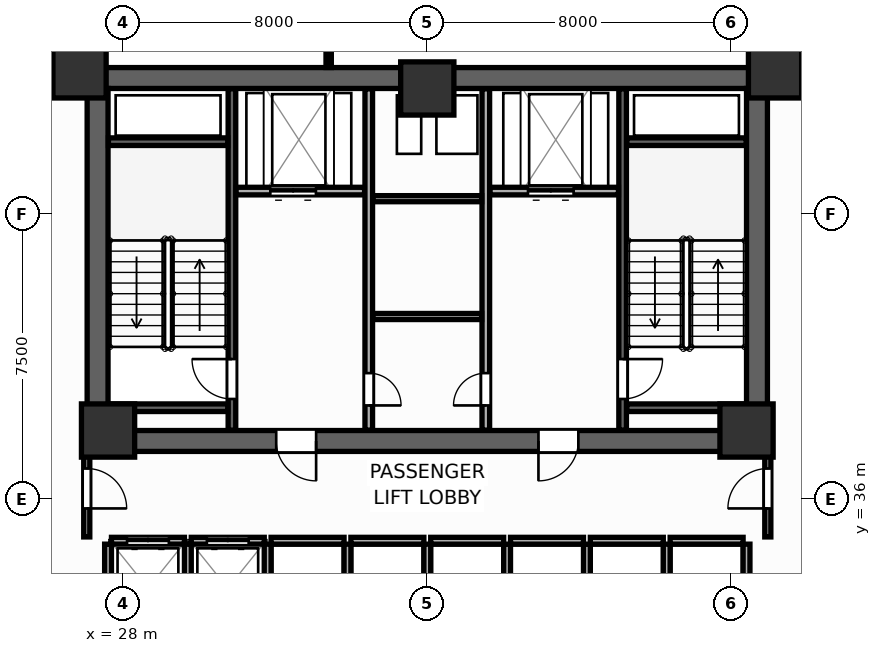
"""IFC4 building model, lengths in metres.
Left out: names, types, materials, properties, quantities, classifications, styles, units other than length and angle.
Written with IfcOpenShell. Run it as: python <this file> out.ifc"""

import sys

from ifc_helpers import new_model, si_unit, direction, frame, frame_2d, origin, origin_2d, place, context, subcontext, project, spatial, rectangle, extrude, source, transform, mapped, element, fill, save


model = new_model("IFC4")
c1 = context("Model", 3, precision=1e-05, world=origin(), true_north=direction((0.0, 1.0)))
c2 = subcontext(c1, "Body", "Model", "MODEL_VIEW")
j1 = project(units=[si_unit("LENGTHUNIT", "METRE"), si_unit("PLANEANGLEUNIT", "RADIAN")], contexts=[c1])
p1 = place(None, origin())
s1 = spatial("IfcSite", under=j1, at=p1, CompositionType="ELEMENT")
p2 = place(p1, origin())
s2 = spatial("IfcBuilding", under=s1, at=p2, CompositionType="ELEMENT")
p3 = place(p2, frame((0.0, 0.0, 27.9)))
s3 = spatial("IfcBuildingStorey", under=s2, at=p3, CompositionType="ELEMENT", Elevation=27.9)
p4 = place(p3, frame((27.05, 47.075, 0.0), z_axis=(0.0, 0.0, 1.0), x_axis=(1.0, 0.0, 0.0)))
e1 = element("IfcWall", 1, at=p4, inside=s3, PredefinedType="SHEAR", context=c2, shape_type="SweptSolid", body=[
    extrude(rectangle(XDim=17.9, YDim=0.55, at=frame_2d((8.95, 0.0))), origin(), (0.0, 0.0, 1.0), 3.9),
])
p5 = place(p3, frame((27.05, 37.525, 0.0), z_axis=(0.0, 0.0, 1.0), x_axis=(1.0, 0.0, 0.0)))
e2 = element("IfcWall", 2, at=p5, inside=s3, PredefinedType="SHEAR", context=c2, shape_type="SweptSolid", body=[
    extrude(rectangle(XDim=17.9, YDim=0.55, at=frame_2d((8.95, 0.0))), origin(), (0.0, 0.0, 1.0), 3.9),
])
p6 = place(p5, frame((4.975, 0.0, 0.0)))
e3 = element("IfcOpeningElement", 3, at=p6, cuts=e2, PredefinedType="OPENING", context=c2, shape_type="SweptSolid", body=[
    extrude(rectangle(XDim=1.05, YDim=2.1, at=frame_2d((0.525, 1.05))), frame((0.0, 0.285, 0.0), z_axis=(0.0, -1.0, 0.0), x_axis=(1.0, 0.0, 0.0)), (0.0, 0.0, 1.0), 0.57),
])
p7 = place(p5, frame((11.875, 0.0, 0.0)))
e4 = element("IfcOpeningElement", 4, at=p7, cuts=e2, PredefinedType="OPENING", context=c2, shape_type="SweptSolid", body=[
    extrude(rectangle(XDim=1.05, YDim=2.1, at=frame_2d((0.525, 1.05))), frame((0.0, 0.285, 0.0), z_axis=(0.0, -1.0, 0.0), x_axis=(1.0, 0.0, 0.0)), (0.0, 0.0, 1.0), 0.57),
])
for number, where, z_axis, x_axis in (
    (5, (27.325, 37.8, 0.0), (0.0, 0.0, 1.0), (0.0, 1.0, 0.0)),
    (6, (44.675, 37.8, 0.0), (0.0, 0.0, 1.0), (0.0, 1.0, 0.0)),
):
    element("IfcWall", number, at=place(p3, frame(where, z_axis=z_axis, x_axis=x_axis)), inside=s3, PredefinedType="SHEAR", context=c2, shape_type="SweptSolid", body=[
        extrude(rectangle(XDim=9.0, YDim=0.55, at=frame_2d((4.5, 0.0))), origin(), (0.0, 0.0, 1.0), 3.9),
    ])
m1 = source(origin(), c2, "Body", "SweptSolid", [
    extrude(rectangle(XDim=1.4, YDim=1.4, at=origin_2d()), origin(), (0.0, 0.0, 1.0), 3.9),
])
for number, where, z_axis, x_axis in (
    (7, (26.85, 47.25, 0.0), (0.0, 0.0, 1.0), (1.0, 0.0, 0.0)),
    (8, (45.15, 47.25, 0.0), (0.0, 0.0, 1.0), (1.0, 0.0, 0.0)),
    (9, (27.6, 37.8, 0.0), (0.0, 0.0, 1.0), (1.0, 0.0, 0.0)),
    (10, (44.4, 37.8, 0.0), (0.0, 0.0, 1.0), (1.0, 0.0, 0.0)),
    (11, (36.0, 46.8, 0.0), (0.0, 0.0, 1.0), (1.0, 0.0, 0.0)),
):
    element("IfcColumn", number, at=place(p3, frame(where, z_axis=z_axis, x_axis=x_axis)), inside=s3, PredefinedType="COLUMN", context=c2, shape_type="MappedRepresentation", body=[
        mapped(m1, transform((0.0, 0.0, 0.0), scale=1.0)),
    ])
p8 = place(p3, frame((30.86, 37.81, 0.0), z_axis=(0.0, 0.0, 1.0), x_axis=(0.0, 1.0, 0.0)))
e12 = element("IfcWall", 12, at=p8, inside=s3, PredefinedType="SHEAR", context=c2, shape_type="SweptSolid", body=[
    extrude(rectangle(XDim=8.98, YDim=0.2, at=frame_2d((4.49, 0.0))), origin(), (0.0, 0.0, 1.0), 3.9),
])
p9 = place(p8, frame((0.82, 0.0, 0.0)))
e13 = element("IfcOpeningElement", 13, at=p9, cuts=e12, PredefinedType="OPENING", context=c2, shape_type="SweptSolid", body=[
    extrude(rectangle(XDim=1.05, YDim=2.1, at=frame_2d((0.525, 1.05))), frame((0.0, 0.11, 0.0), z_axis=(0.0, -1.0, 0.0), x_axis=(1.0, 0.0, 0.0)), (0.0, 0.0, 1.0), 0.22),
])
for number, where, z_axis, x_axis in (
    (14, (27.61, 45.4, 0.0), (0.0, 0.0, 1.0), (1.0, 0.0, 0.0)),
    (15, (27.61, 38.4, 0.0), (0.0, 0.0, 1.0), (1.0, 0.0, 0.0)),
):
    element("IfcWall", number, at=place(p3, frame(where, z_axis=z_axis, x_axis=x_axis)), inside=s3, PredefinedType="SHEAR", context=c2, shape_type="SweptSolid", body=[
        extrude(rectangle(XDim=3.14, YDim=0.2, at=frame_2d((1.57, 0.0))), origin(), (0.0, 0.0, 1.0), 3.9),
    ])
p10 = place(p3, frame((41.14, 37.81, 0.0), z_axis=(0.0, 0.0, 1.0), x_axis=(0.0, 1.0, 0.0)))
e16 = element("IfcWall", 16, at=p10, inside=s3, PredefinedType="SHEAR", context=c2, shape_type="SweptSolid", body=[
    extrude(rectangle(XDim=8.98, YDim=0.2, at=frame_2d((4.49, 0.0))), origin(), (0.0, 0.0, 1.0), 3.9),
])
p11 = place(p10, frame((0.82, 0.0, 0.0)))
e17 = element("IfcOpeningElement", 17, at=p11, cuts=e16, PredefinedType="OPENING", context=c2, shape_type="SweptSolid", body=[
    extrude(rectangle(XDim=1.05, YDim=2.1, at=frame_2d((0.525, 1.05))), frame((0.0, 0.11, 0.0), z_axis=(0.0, -1.0, 0.0), x_axis=(1.0, 0.0, 0.0)), (0.0, 0.0, 1.0), 0.22),
])
for number, where, z_axis, x_axis in (
    (18, (41.25, 45.4, 0.0), (0.0, 0.0, 1.0), (1.0, 0.0, 0.0)),
    (19, (41.25, 38.4, 0.0), (0.0, 0.0, 1.0), (1.0, 0.0, 0.0)),
):
    element("IfcWall", number, at=place(p3, frame(where, z_axis=z_axis, x_axis=x_axis)), inside=s3, PredefinedType="SHEAR", context=c2, shape_type="SweptSolid", body=[
        extrude(rectangle(XDim=3.14, YDim=0.2, at=frame_2d((1.57, 0.0))), origin(), (0.0, 0.0, 1.0), 3.9),
    ])
p12 = place(p3, frame((30.97, 44.1, 0.0), z_axis=(0.0, 0.0, 1.0), x_axis=(1.0, 0.0, 0.0)))
e20 = element("IfcWall", 20, at=p12, inside=s3, PredefinedType="PARTITIONING", context=c2, shape_type="SweptSolid", body=[
    extrude(rectangle(XDim=3.38, YDim=0.2, at=frame_2d((1.69, 0.0))), origin(), (0.0, 0.0, 1.0), 3.68),
])
p13 = place(p12, frame((0.9, 0.0, 0.0)))
e21 = element("IfcOpeningElement", 21, at=p13, cuts=e20, PredefinedType="OPENING", context=c2, shape_type="SweptSolid", body=[
    extrude(rectangle(XDim=1.2, YDim=2.1, at=frame_2d((0.6, 1.05))), frame((0.0, 0.11, 0.0), z_axis=(0.0, -1.0, 0.0), x_axis=(1.0, 0.0, 0.0)), (0.0, 0.0, 1.0), 0.22),
])
p14 = place(p3, frame((37.65, 44.1, 0.0), z_axis=(0.0, 0.0, 1.0), x_axis=(1.0, 0.0, 0.0)))
e22 = element("IfcWall", 22, at=p14, inside=s3, PredefinedType="PARTITIONING", context=c2, shape_type="SweptSolid", body=[
    extrude(rectangle(XDim=3.38, YDim=0.2, at=frame_2d((1.69, 0.0))), origin(), (0.0, 0.0, 1.0), 3.68),
])
p15 = place(p14, frame((1.0, 0.0, 0.0)))
e23 = element("IfcOpeningElement", 23, at=p15, cuts=e22, PredefinedType="OPENING", context=c2, shape_type="SweptSolid", body=[
    extrude(rectangle(XDim=1.2, YDim=2.1, at=frame_2d((0.6, 1.05))), frame((0.0, 0.11, 0.0), z_axis=(0.0, -1.0, 0.0), x_axis=(1.0, 0.0, 0.0)), (0.0, 0.0, 1.0), 0.22),
])
p16 = place(p3, frame((34.46, 37.81, 0.0), z_axis=(0.0, 0.0, 1.0), x_axis=(0.0, 1.0, 0.0)))
e24 = element("IfcWall", 24, at=p16, inside=s3, PredefinedType="PARTITIONING", context=c2, shape_type="SweptSolid", body=[
    extrude(rectangle(XDim=8.98, YDim=0.2, at=frame_2d((4.49, 0.0))), origin(), (0.0, 0.0, 1.0), 3.68),
])
p17 = place(p16, frame((0.65, 0.0, 0.0)))
e25 = element("IfcOpeningElement", 25, at=p17, cuts=e24, PredefinedType="OPENING", context=c2, shape_type="SweptSolid", body=[
    extrude(rectangle(XDim=0.85, YDim=2.05, at=frame_2d((0.425, 1.025))), frame((0.0, 0.11, 0.0), z_axis=(0.0, -1.0, 0.0), x_axis=(1.0, 0.0, 0.0)), (0.0, 0.0, 1.0), 0.22),
])
p18 = place(p3, frame((37.54, 37.81, 0.0), z_axis=(0.0, 0.0, 1.0), x_axis=(0.0, 1.0, 0.0)))
e26 = element("IfcWall", 26, at=p18, inside=s3, PredefinedType="PARTITIONING", context=c2, shape_type="SweptSolid", body=[
    extrude(rectangle(XDim=8.98, YDim=0.2, at=frame_2d((4.49, 0.0))), origin(), (0.0, 0.0, 1.0), 3.68),
])
p19 = place(p18, frame((0.65, 0.0, 0.0)))
e27 = element("IfcOpeningElement", 27, at=p19, cuts=e26, PredefinedType="OPENING", context=c2, shape_type="SweptSolid", body=[
    extrude(rectangle(XDim=0.85, YDim=2.05, at=frame_2d((0.425, 1.025))), frame((0.0, 0.11, 0.0), z_axis=(0.0, -1.0, 0.0), x_axis=(1.0, 0.0, 0.0)), (0.0, 0.0, 1.0), 0.22),
])
for number, where, z_axis, x_axis in (
    (28, (34.57, 40.8, 0.0), (0.0, 0.0, 1.0), (1.0, 0.0, 0.0)),
    (29, (34.57, 43.9, 0.0), (0.0, 0.0, 1.0), (1.0, 0.0, 0.0)),
):
    element("IfcWall", number, at=place(p3, frame(where, z_axis=z_axis, x_axis=x_axis)), inside=s3, PredefinedType="PARTITIONING", context=c2, shape_type="SweptSolid", body=[
        extrude(rectangle(XDim=2.86, YDim=0.16, at=frame_2d((1.43, 0.0))), origin(), (0.0, 0.0, 1.0), 3.68),
    ])
p20 = place(p3, frame((27.69, 34.9, 0.0), z_axis=(0.0, 0.0, 1.0), x_axis=(1.0, 0.0, 0.0)))
e30 = element("IfcWall", 30, at=p20, inside=s3, PredefinedType="PARTITIONING", context=c2, shape_type="SweptSolid", body=[
    extrude(rectangle(XDim=1.92, YDim=0.18, at=frame_2d((0.96, 0.0))), origin(), (0.0, 0.0, 1.0), 3.68),
])
p21 = place(p20, frame((0.41, 0.0, 0.0)))
e31 = element("IfcOpeningElement", 31, at=p21, cuts=e30, PredefinedType="OPENING", context=c2, shape_type="SweptSolid", body=[
    extrude(rectangle(XDim=1.1, YDim=2.1, at=frame_2d((0.55, 1.05))), frame((0.0, 0.1, 0.0), z_axis=(0.0, -1.0, 0.0), x_axis=(1.0, 0.0, 0.0)), (0.0, 0.0, 1.0), 0.2),
])
p22 = place(p3, frame((27.6, 32.49, 0.0), z_axis=(0.0, 0.0, 1.0), x_axis=(0.0, 1.0, 0.0)))
e32 = element("IfcWall", 32, at=p22, inside=s3, PredefinedType="PARTITIONING", context=c2, shape_type="SweptSolid", body=[
    extrude(rectangle(XDim=2.32, YDim=0.18, at=frame_2d((1.16, 0.0))), origin(), (0.0, 0.0, 1.0), 3.68),
])
p23 = place(p3, frame((29.79, 34.9, 0.0), z_axis=(0.0, 0.0, 1.0), x_axis=(1.0, 0.0, 0.0)))
e33 = element("IfcWall", 33, at=p23, inside=s3, PredefinedType="PARTITIONING", context=c2, shape_type="SweptSolid", body=[
    extrude(rectangle(XDim=1.92, YDim=0.18, at=frame_2d((0.96, 0.0))), origin(), (0.0, 0.0, 1.0), 3.68),
])
p24 = place(p23, frame((0.41, 0.0, 0.0)))
e34 = element("IfcOpeningElement", 34, at=p24, cuts=e33, PredefinedType="OPENING", context=c2, shape_type="SweptSolid", body=[
    extrude(rectangle(XDim=1.1, YDim=2.1, at=frame_2d((0.55, 1.05))), frame((0.0, 0.1, 0.0), z_axis=(0.0, -1.0, 0.0), x_axis=(1.0, 0.0, 0.0)), (0.0, 0.0, 1.0), 0.2),
])
p25 = place(p3, frame((29.7, 32.49, 0.0), z_axis=(0.0, 0.0, 1.0), x_axis=(0.0, 1.0, 0.0)))
e35 = element("IfcWall", 35, at=p25, inside=s3, PredefinedType="PARTITIONING", context=c2, shape_type="SweptSolid", body=[
    extrude(rectangle(XDim=2.32, YDim=0.18, at=frame_2d((1.16, 0.0))), origin(), (0.0, 0.0, 1.0), 3.68),
])
p26 = place(p3, frame((31.89, 34.9, 0.0), z_axis=(0.0, 0.0, 1.0), x_axis=(1.0, 0.0, 0.0)))
e36 = element("IfcWall", 36, at=p26, inside=s3, PredefinedType="PARTITIONING", context=c2, shape_type="SweptSolid", body=[
    extrude(rectangle(XDim=1.92, YDim=0.18, at=frame_2d((0.96, 0.0))), origin(), (0.0, 0.0, 1.0), 3.68),
])
p27 = place(p3, frame((31.8, 32.49, 0.0), z_axis=(0.0, 0.0, 1.0), x_axis=(0.0, 1.0, 0.0)))
e37 = element("IfcWall", 37, at=p27, inside=s3, PredefinedType="PARTITIONING", context=c2, shape_type="SweptSolid", body=[
    extrude(rectangle(XDim=2.32, YDim=0.18, at=frame_2d((1.16, 0.0))), origin(), (0.0, 0.0, 1.0), 3.68),
])
p28 = place(p3, frame((33.99, 34.9, 0.0), z_axis=(0.0, 0.0, 1.0), x_axis=(1.0, 0.0, 0.0)))
e38 = element("IfcWall", 38, at=p28, inside=s3, PredefinedType="PARTITIONING", context=c2, shape_type="SweptSolid", body=[
    extrude(rectangle(XDim=1.92, YDim=0.18, at=frame_2d((0.96, 0.0))), origin(), (0.0, 0.0, 1.0), 3.68),
])
p29 = place(p3, frame((33.9, 32.49, 0.0), z_axis=(0.0, 0.0, 1.0), x_axis=(0.0, 1.0, 0.0)))
e39 = element("IfcWall", 39, at=p29, inside=s3, PredefinedType="PARTITIONING", context=c2, shape_type="SweptSolid", body=[
    extrude(rectangle(XDim=2.32, YDim=0.18, at=frame_2d((1.16, 0.0))), origin(), (0.0, 0.0, 1.0), 3.68),
])
p30 = place(p3, frame((36.09, 34.9, 0.0), z_axis=(0.0, 0.0, 1.0), x_axis=(1.0, 0.0, 0.0)))
e40 = element("IfcWall", 40, at=p30, inside=s3, PredefinedType="PARTITIONING", context=c2, shape_type="SweptSolid", body=[
    extrude(rectangle(XDim=1.92, YDim=0.18, at=frame_2d((0.96, 0.0))), origin(), (0.0, 0.0, 1.0), 3.68),
])
p31 = place(p3, frame((36.0, 32.49, 0.0), z_axis=(0.0, 0.0, 1.0), x_axis=(0.0, 1.0, 0.0)))
e41 = element("IfcWall", 41, at=p31, inside=s3, PredefinedType="PARTITIONING", context=c2, shape_type="SweptSolid", body=[
    extrude(rectangle(XDim=2.32, YDim=0.18, at=frame_2d((1.16, 0.0))), origin(), (0.0, 0.0, 1.0), 3.68),
])
p32 = place(p3, frame((38.19, 34.9, 0.0), z_axis=(0.0, 0.0, 1.0), x_axis=(1.0, 0.0, 0.0)))
e42 = element("IfcWall", 42, at=p32, inside=s3, PredefinedType="PARTITIONING", context=c2, shape_type="SweptSolid", body=[
    extrude(rectangle(XDim=1.92, YDim=0.18, at=frame_2d((0.96, 0.0))), origin(), (0.0, 0.0, 1.0), 3.68),
])
p33 = place(p3, frame((38.1, 32.49, 0.0), z_axis=(0.0, 0.0, 1.0), x_axis=(0.0, 1.0, 0.0)))
e43 = element("IfcWall", 43, at=p33, inside=s3, PredefinedType="PARTITIONING", context=c2, shape_type="SweptSolid", body=[
    extrude(rectangle(XDim=2.32, YDim=0.18, at=frame_2d((1.16, 0.0))), origin(), (0.0, 0.0, 1.0), 3.68),
])
p34 = place(p3, frame((40.29, 34.9, 0.0), z_axis=(0.0, 0.0, 1.0), x_axis=(1.0, 0.0, 0.0)))
e44 = element("IfcWall", 44, at=p34, inside=s3, PredefinedType="PARTITIONING", context=c2, shape_type="SweptSolid", body=[
    extrude(rectangle(XDim=1.92, YDim=0.18, at=frame_2d((0.96, 0.0))), origin(), (0.0, 0.0, 1.0), 3.68),
])
p35 = place(p3, frame((40.2, 32.49, 0.0), z_axis=(0.0, 0.0, 1.0), x_axis=(0.0, 1.0, 0.0)))
e45 = element("IfcWall", 45, at=p35, inside=s3, PredefinedType="PARTITIONING", context=c2, shape_type="SweptSolid", body=[
    extrude(rectangle(XDim=2.32, YDim=0.18, at=frame_2d((1.16, 0.0))), origin(), (0.0, 0.0, 1.0), 3.68),
])
p36 = place(p3, frame((42.39, 34.9, 0.0), z_axis=(0.0, 0.0, 1.0), x_axis=(1.0, 0.0, 0.0)))
e46 = element("IfcWall", 46, at=p36, inside=s3, PredefinedType="PARTITIONING", context=c2, shape_type="SweptSolid", body=[
    extrude(rectangle(XDim=1.92, YDim=0.18, at=frame_2d((0.96, 0.0))), origin(), (0.0, 0.0, 1.0), 3.68),
])
for number, where, z_axis, x_axis in (
    (47, (42.3, 32.49, 0.0), (0.0, 0.0, 1.0), (0.0, 1.0, 0.0)),
    (48, (44.4, 32.49, 0.0), (0.0, 0.0, 1.0), (0.0, 1.0, 0.0)),
):
    element("IfcWall", number, at=place(p3, frame(where, z_axis=z_axis, x_axis=x_axis)), inside=s3, PredefinedType="PARTITIONING", context=c2, shape_type="SweptSolid", body=[
        extrude(rectangle(XDim=2.32, YDim=0.18, at=frame_2d((1.16, 0.0))), origin(), (0.0, 0.0, 1.0), 3.68),
    ])
p37 = place(p3, frame((27.04, 35.0, 0.0), z_axis=(0.0, 0.0, 1.0), x_axis=(0.0, 1.0, 0.0)))
e49 = element("IfcWall", 49, at=p37, inside=s3, PredefinedType="PARTITIONING", context=c2, shape_type="SweptSolid", body=[
    extrude(rectangle(XDim=2.65, YDim=0.16, at=frame_2d((1.325, 0.0))), origin(), (0.0, 0.0, 1.0), 3.68),
])
p38 = place(p37, frame((0.75, 0.0, 0.0)))
e50 = element("IfcOpeningElement", 50, at=p38, cuts=e49, PredefinedType="OPENING", context=c2, shape_type="SweptSolid", body=[
    extrude(rectangle(XDim=1.05, YDim=2.1, at=frame_2d((0.525, 1.05))), frame((0.0, 0.09, 0.0), z_axis=(0.0, -1.0, 0.0), x_axis=(1.0, 0.0, 0.0)), (0.0, 0.0, 1.0), 0.18),
])
p39 = place(p3, frame((44.96, 35.0, 0.0), z_axis=(0.0, 0.0, 1.0), x_axis=(0.0, 1.0, 0.0)))
e51 = element("IfcWall", 51, at=p39, inside=s3, PredefinedType="PARTITIONING", context=c2, shape_type="SweptSolid", body=[
    extrude(rectangle(XDim=2.65, YDim=0.16, at=frame_2d((1.325, 0.0))), origin(), (0.0, 0.0, 1.0), 3.68),
])
p40 = place(p39, frame((0.75, 0.0, 0.0)))
e52 = element("IfcOpeningElement", 52, at=p40, cuts=e51, PredefinedType="OPENING", context=c2, shape_type="SweptSolid", body=[
    extrude(rectangle(XDim=1.05, YDim=2.1, at=frame_2d((0.525, 1.05))), frame((0.0, 0.09, 0.0), z_axis=(0.0, -1.0, 0.0), x_axis=(1.0, 0.0, 0.0)), (0.0, 0.0, 1.0), 0.18),
])
p41 = place(p3, frame((27.035, 47.34, 0.0), z_axis=(0.0, 0.0, 1.0), x_axis=(0.0, 1.0, 0.0)))
e53 = element("IfcWall", 53, at=p41, inside=s3, PredefinedType="PARTITIONING", context=c2, shape_type="SweptSolid", body=[
    extrude(rectangle(XDim=10.41, YDim=0.16, at=frame_2d((5.205, 0.0))), origin(), (0.0, 0.0, 1.0), 3.18),
])
p42 = place(p41, frame((4.73, 0.0, 0.0)))
e54 = element("IfcOpeningElement", 54, at=p42, cuts=e53, PredefinedType="OPENING", context=c2, shape_type="SweptSolid", body=[
    extrude(rectangle(XDim=0.95, YDim=2.05, at=frame_2d((0.475, 1.025))), frame((0.0, 0.09, 0.0), z_axis=(0.0, -1.0, 0.0), x_axis=(1.0, 0.0, 0.0)), (0.0, 0.0, 1.0), 0.18),
])
p43 = place(p3, frame((44.965, 47.34, 0.0), z_axis=(0.0, 0.0, 1.0), x_axis=(0.0, 1.0, 0.0)))
e55 = element("IfcWall", 55, at=p43, inside=s3, PredefinedType="PARTITIONING", context=c2, shape_type="SweptSolid", body=[
    extrude(rectangle(XDim=10.41, YDim=0.16, at=frame_2d((5.205, 0.0))), origin(), (0.0, 0.0, 1.0), 3.18),
])
p44 = place(p3, frame((33.405, 47.352, 0.0), z_axis=(0.0, 0.0, 1.0), x_axis=(0.0, 1.0, 0.0)))
e56 = element("IfcWall", 56, at=p44, inside=s3, PredefinedType="PARTITIONING", context=c2, shape_type="SweptSolid", body=[
    extrude(rectangle(XDim=10.545, YDim=0.14, at=frame_2d((5.272, 0.0))), origin(), (0.0, 0.0, 1.0), 3.68),
])
p45 = place(p44, frame((4.798, 0.0, 0.0)))
e57 = element("IfcOpeningElement", 57, at=p45, cuts=e56, PredefinedType="OPENING", context=c2, shape_type="SweptSolid", body=[
    extrude(rectangle(XDim=0.95, YDim=2.05, at=frame_2d((0.475, 1.025))), frame((0.0, 0.08, 0.0), z_axis=(0.0, -1.0, 0.0), x_axis=(1.0, 0.0, 0.0)), (0.0, 0.0, 1.0), 0.16),
])
p46 = place(p9, origin())
e58 = element("IfcDoor", 58, at=p46, inside=s3, OperationType="SINGLE_SWING_RIGHT", PredefinedType="DOOR", context=c2, shape_type="SweptSolid", body=[
    extrude(rectangle(XDim=1.05, YDim=2.1, at=frame_2d((0.525, 1.05))), frame((0.0, 0.025, 0.0), z_axis=(0.0, -1.0, 0.0), x_axis=(1.0, 0.0, 0.0)), (0.0, 0.0, 1.0), 0.05),
])
fill(e13, e58)
p47 = place(p11, frame((1.05, 0.0, 0.0), z_axis=(0.0, 0.0, 1.0), x_axis=(-1.0, 0.0, 0.0)))
e59 = element("IfcDoor", 59, at=p47, inside=s3, OperationType="SINGLE_SWING_LEFT", PredefinedType="DOOR", context=c2, shape_type="SweptSolid", body=[
    extrude(rectangle(XDim=1.05, YDim=2.1, at=frame_2d((0.525, 1.05))), frame((0.0, 0.025, 0.0), z_axis=(0.0, -1.0, 0.0), x_axis=(1.0, 0.0, 0.0)), (0.0, 0.0, 1.0), 0.05),
])
fill(e17, e59)
p48 = place(p13, origin())
e60 = element("IfcDoor", 60, at=p48, inside=s3, OperationType="DOUBLE_DOOR_SLIDING", PredefinedType="DOOR", context=c2, shape_type="SweptSolid", body=[
    extrude(rectangle(XDim=1.2, YDim=2.1, at=frame_2d((0.6, 1.05))), frame((0.0, 0.025, 0.0), z_axis=(0.0, -1.0, 0.0), x_axis=(1.0, 0.0, 0.0)), (0.0, 0.0, 1.0), 0.05),
])
fill(e21, e60)
p49 = place(p15, origin())
e61 = element("IfcDoor", 61, at=p49, inside=s3, OperationType="DOUBLE_DOOR_SLIDING", PredefinedType="DOOR", context=c2, shape_type="SweptSolid", body=[
    extrude(rectangle(XDim=1.2, YDim=2.1, at=frame_2d((0.6, 1.05))), frame((0.0, 0.025, 0.0), z_axis=(0.0, -1.0, 0.0), x_axis=(1.0, 0.0, 0.0)), (0.0, 0.0, 1.0), 0.05),
])
fill(e23, e61)
p50 = place(p17, frame((0.85, 0.0, 0.0), z_axis=(0.0, 0.0, 1.0), x_axis=(-1.0, 0.0, 0.0)))
e62 = element("IfcDoor", 62, at=p50, inside=s3, OperationType="SINGLE_SWING_RIGHT", PredefinedType="DOOR", context=c2, shape_type="SweptSolid", body=[
    extrude(rectangle(XDim=0.85, YDim=2.05, at=frame_2d((0.425, 1.025))), frame((0.0, 0.025, 0.0), z_axis=(0.0, -1.0, 0.0), x_axis=(1.0, 0.0, 0.0)), (0.0, 0.0, 1.0), 0.05),
])
fill(e25, e62)
p51 = place(p19, origin())
e63 = element("IfcDoor", 63, at=p51, inside=s3, OperationType="SINGLE_SWING_LEFT", PredefinedType="DOOR", context=c2, shape_type="SweptSolid", body=[
    extrude(rectangle(XDim=0.85, YDim=2.05, at=frame_2d((0.425, 1.025))), frame((0.0, 0.025, 0.0), z_axis=(0.0, -1.0, 0.0), x_axis=(1.0, 0.0, 0.0)), (0.0, 0.0, 1.0), 0.05),
])
fill(e27, e63)
p52 = place(p21, origin())
e64 = element("IfcDoor", 64, at=p52, inside=s3, OperationType="DOUBLE_DOOR_SLIDING", PredefinedType="DOOR", context=c2, shape_type="SweptSolid", body=[
    extrude(rectangle(XDim=1.1, YDim=2.1, at=frame_2d((0.55, 1.05))), frame((0.0, 0.025, 0.0), z_axis=(0.0, -1.0, 0.0), x_axis=(1.0, 0.0, 0.0)), (0.0, 0.0, 1.0), 0.05),
])
fill(e31, e64)
p53 = place(p24, origin())
e65 = element("IfcDoor", 65, at=p53, inside=s3, OperationType="DOUBLE_DOOR_SLIDING", PredefinedType="DOOR", context=c2, shape_type="SweptSolid", body=[
    extrude(rectangle(XDim=1.1, YDim=2.1, at=frame_2d((0.55, 1.05))), frame((0.0, 0.025, 0.0), z_axis=(0.0, -1.0, 0.0), x_axis=(1.0, 0.0, 0.0)), (0.0, 0.0, 1.0), 0.05),
])
fill(e34, e65)
p54 = place(p38, frame((1.05, 0.0, 0.0), z_axis=(0.0, 0.0, 1.0), x_axis=(-1.0, 0.0, 0.0)))
e66 = element("IfcDoor", 66, at=p54, inside=s3, OperationType="SINGLE_SWING_RIGHT", PredefinedType="DOOR", context=c2, shape_type="SweptSolid", body=[
    extrude(rectangle(XDim=1.05, YDim=2.1, at=frame_2d((0.525, 1.05))), frame((0.0, 0.025, 0.0), z_axis=(0.0, -1.0, 0.0), x_axis=(1.0, 0.0, 0.0)), (0.0, 0.0, 1.0), 0.05),
])
fill(e50, e66)
p55 = place(p40, origin())
e67 = element("IfcDoor", 67, at=p55, inside=s3, OperationType="SINGLE_SWING_LEFT", PredefinedType="DOOR", context=c2, shape_type="SweptSolid", body=[
    extrude(rectangle(XDim=1.05, YDim=2.1, at=frame_2d((0.525, 1.05))), frame((0.0, 0.025, 0.0), z_axis=(0.0, -1.0, 0.0), x_axis=(1.0, 0.0, 0.0)), (0.0, 0.0, 1.0), 0.05),
])
fill(e52, e67)
p56 = place(p6, frame((1.05, 0.0, 0.0), z_axis=(0.0, 0.0, 1.0), x_axis=(-1.0, 0.0, 0.0)))
e68 = element("IfcDoor", 68, at=p56, inside=s3, OperationType="SINGLE_SWING_LEFT", PredefinedType="DOOR", context=c2, shape_type="SweptSolid", body=[
    extrude(rectangle(XDim=1.05, YDim=2.1, at=frame_2d((0.525, 1.05))), frame((0.0, 0.025, 0.0), z_axis=(0.0, -1.0, 0.0), x_axis=(1.0, 0.0, 0.0)), (0.0, 0.0, 1.0), 0.05),
])
fill(e3, e68)
p57 = place(p7, frame((1.05, 0.0, 0.0), z_axis=(0.0, 0.0, 1.0), x_axis=(-1.0, 0.0, 0.0)))
e69 = element("IfcDoor", 69, at=p57, inside=s3, OperationType="SINGLE_SWING_RIGHT", PredefinedType="DOOR", context=c2, shape_type="SweptSolid", body=[
    extrude(rectangle(XDim=1.05, YDim=2.1, at=frame_2d((0.525, 1.05))), frame((0.0, 0.025, 0.0), z_axis=(0.0, -1.0, 0.0), x_axis=(1.0, 0.0, 0.0)), (0.0, 0.0, 1.0), 0.05),
])
fill(e4, e69)
save(model, sys.argv[1])
